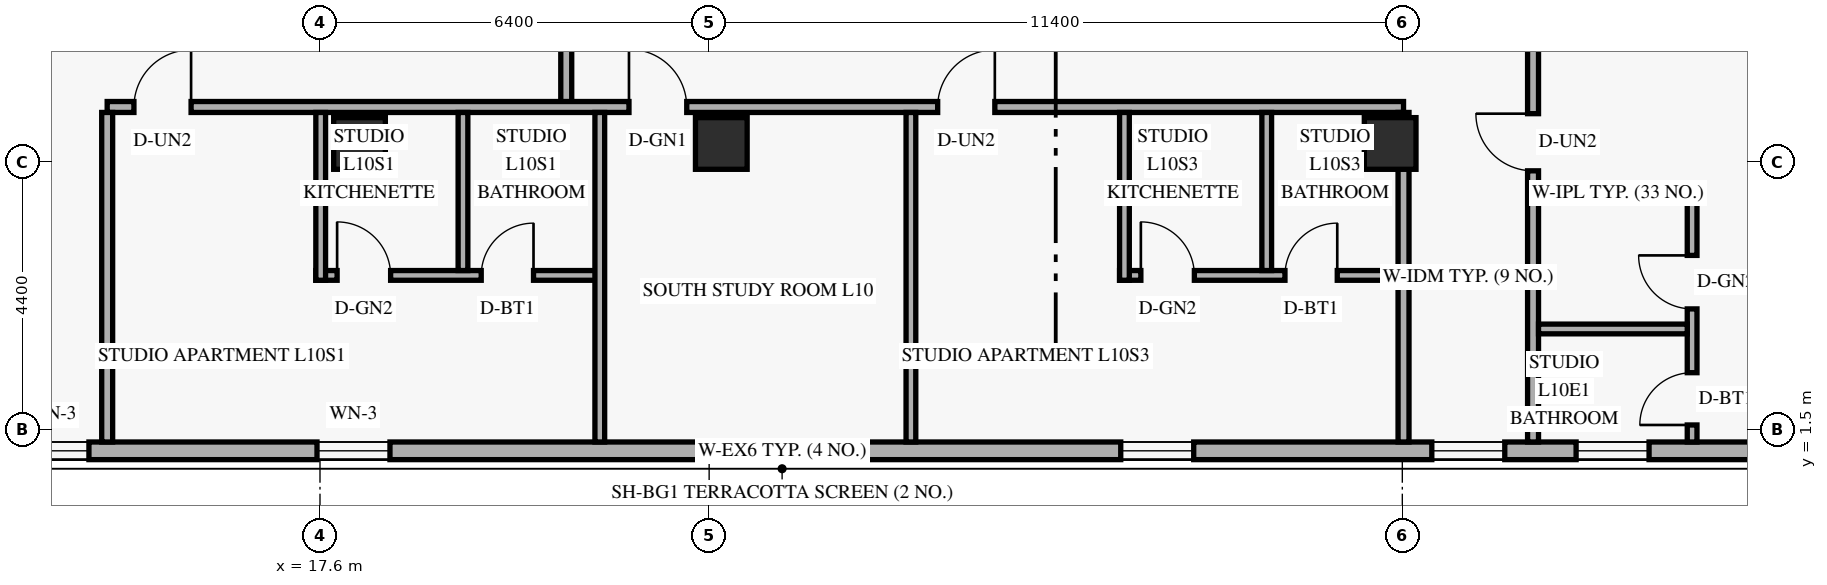
"""IFC4 building model, lengths in metres.
Left out: names, types, materials, properties, quantities, classifications, styles, units other than length and angle.
Written with IfcOpenShell. Run it as: python <this file> out.ifc"""

import sys

from ifc_helpers import new_model, si_unit, direction, frame, frame_2d, origin, origin_2d, place, context, subcontext, project, spatial, rectangle, extrude, element, fill, save


model = new_model("IFC4")
c1 = context("Model", 3, precision=1e-05, world=origin(), true_north=direction((0.0, 1.0)))
c2 = subcontext(c1, "Body", "Model", "MODEL_VIEW")
j1 = project(units=[si_unit("LENGTHUNIT", "METRE"), si_unit("PLANEANGLEUNIT", "RADIAN")], contexts=[c1])
p1 = place(None, origin())
s1 = spatial("IfcSite", under=j1, at=p1, CompositionType="ELEMENT")
p2 = place(p1, origin())
s2 = spatial("IfcBuilding", under=s1, at=p2, CompositionType="ELEMENT")
p3 = place(p2, frame((0.0, 0.0, 42.0)))
s3 = spatial("IfcBuildingStorey", under=s2, at=p3, CompositionType="ELEMENT", Elevation=42.0)
for number, where, z_axis, x_axis in (
    (1, (18.25, 6.2, 0.0), (0.0, 0.0, 1.0), (1.0, 0.0, 0.0)),
    (2, (24.2, 6.2, 0.0), (0.0, 0.0, 1.0), (1.0, 0.0, 0.0)),
    (3, (35.2, 6.2, 0.0), (0.0, 0.0, 1.0), (1.0, 0.0, 0.0)),
):
    element("IfcColumn", number, at=place(p3, frame(where, z_axis=z_axis, x_axis=x_axis)), inside=s3, PredefinedType="COLUMN", context=c2, shape_type="SweptSolid", body=[
        extrude(rectangle(XDim=0.85, YDim=0.85, at=origin_2d()), origin(), (0.0, 0.0, 1.0), 3.6),
    ])
p4 = place(p3, frame((5.42, 1.145, 0.0), z_axis=(0.0, 0.0, 1.0), x_axis=(1.0, 0.0, 0.0)))
e4 = element("IfcWall", 4, at=p4, inside=s3, PredefinedType="SOLIDWALL", context=c2, shape_type="SweptSolid", body=[
    extrude(rectangle(XDim=39.56, YDim=0.29, at=frame_2d((19.78, 0.0))), origin(), (0.0, 0.0, 1.0), 3.36),
])
p5 = place(p4, frame((2.84, 0.0, 0.85)))
e5 = element("IfcOpeningElement", 5, at=p5, cuts=e4, PredefinedType="OPENING", context=c2, shape_type="SweptSolid", body=[
    extrude(rectangle(XDim=1.2, YDim=1.5, at=frame_2d((0.6, 0.75))), frame((0.0, 0.155, 0.0), z_axis=(0.0, -1.0, 0.0), x_axis=(1.0, 0.0, 0.0)), (0.0, 0.0, 1.0), 0.31),
])
p6 = place(p4, frame((7.18, 0.0, 0.85)))
e6 = element("IfcOpeningElement", 6, at=p6, cuts=e4, PredefinedType="OPENING", context=c2, shape_type="SweptSolid", body=[
    extrude(rectangle(XDim=1.2, YDim=1.5, at=frame_2d((0.6, 0.75))), frame((0.0, 0.155, 0.0), z_axis=(0.0, -1.0, 0.0), x_axis=(1.0, 0.0, 0.0)), (0.0, 0.0, 1.0), 0.31),
])
p7 = place(p4, frame((12.131, 0.0, 0.85)))
e7 = element("IfcOpeningElement", 7, at=p7, cuts=e4, PredefinedType="OPENING", context=c2, shape_type="SweptSolid", body=[
    extrude(rectangle(XDim=1.2, YDim=1.5, at=frame_2d((0.6, 0.75))), frame((0.0, 0.155, 0.0), z_axis=(0.0, -1.0, 0.0), x_axis=(1.0, 0.0, 0.0)), (0.0, 0.0, 1.0), 0.31),
])
p8 = place(p4, frame((18.74, 0.0, 0.85)))
e8 = element("IfcOpeningElement", 8, at=p8, cuts=e4, PredefinedType="OPENING", context=c2, shape_type="SweptSolid", body=[
    extrude(rectangle(XDim=1.2, YDim=1.5, at=frame_2d((0.6, 0.75))), frame((0.0, 0.155, 0.0), z_axis=(0.0, -1.0, 0.0), x_axis=(1.0, 0.0, 0.0)), (0.0, 0.0, 1.0), 0.31),
])
p9 = place(p4, frame((25.349, 0.0, 0.85)))
e9 = element("IfcOpeningElement", 9, at=p9, cuts=e4, PredefinedType="OPENING", context=c2, shape_type="SweptSolid", body=[
    extrude(rectangle(XDim=1.2, YDim=1.5, at=frame_2d((0.6, 0.75))), frame((0.0, 0.155, 0.0), z_axis=(0.0, -1.0, 0.0), x_axis=(1.0, 0.0, 0.0)), (0.0, 0.0, 1.0), 0.31),
])
p10 = place(p4, frame((30.465, 0.0, 0.85)))
e10 = element("IfcOpeningElement", 10, at=p10, cuts=e4, PredefinedType="OPENING", context=c2, shape_type="SweptSolid", body=[
    extrude(rectangle(XDim=1.2, YDim=1.5, at=frame_2d((0.6, 0.75))), frame((0.0, 0.155, 0.0), z_axis=(0.0, -1.0, 0.0), x_axis=(1.0, 0.0, 0.0)), (0.0, 0.0, 1.0), 0.31),
])
p11 = place(p4, frame((32.838, 0.0, 0.85)))
e11 = element("IfcOpeningElement", 11, at=p11, cuts=e4, PredefinedType="OPENING", context=c2, shape_type="SweptSolid", body=[
    extrude(rectangle(XDim=1.2, YDim=1.5, at=frame_2d((0.6, 0.75))), frame((0.0, 0.155, 0.0), z_axis=(0.0, -1.0, 0.0), x_axis=(1.0, 0.0, 0.0)), (0.0, 0.0, 1.0), 0.31),
])
p12 = place(p4, frame((36.553, 0.0, 0.85)))
e12 = element("IfcOpeningElement", 12, at=p12, cuts=e4, PredefinedType="OPENING", context=c2, shape_type="SweptSolid", body=[
    extrude(rectangle(XDim=1.2, YDim=1.5, at=frame_2d((0.6, 0.75))), frame((0.0, 0.155, 0.0), z_axis=(0.0, -1.0, 0.0), x_axis=(1.0, 0.0, 0.0)), (0.0, 0.0, 1.0), 0.31),
])
p13 = place(p3, frame((37.55, 1.29, 0.0), z_axis=(0.0, 0.0, 1.0), x_axis=(0.0, 1.0, 0.0)))
e13 = element("IfcWall", 13, at=p13, inside=s3, PredefinedType="STANDARD", context=c2, shape_type="SweptSolid", body=[
    extrude(rectangle(XDim=45.42, YDim=0.18, at=frame_2d((22.71, 0.0))), origin(), (0.0, 0.0, 1.0), 2.649),
])
p14 = place(p13, frame((4.46, 0.0, 0.0)))
e14 = element("IfcOpeningElement", 14, at=p14, cuts=e13, PredefinedType="OPENING", context=c2, shape_type="SweptSolid", body=[
    extrude(rectangle(XDim=0.94, YDim=2.15, at=frame_2d((0.47, 1.075))), frame((0.0, 0.1, 0.0), z_axis=(0.0, -1.0, 0.0), x_axis=(1.0, 0.0, 0.0)), (0.0, 0.0, 1.0), 0.2),
])
p15 = place(p13, frame((15.907, 0.0, 0.0)))
e15 = element("IfcOpeningElement", 15, at=p15, cuts=e13, PredefinedType="OPENING", context=c2, shape_type="SweptSolid", body=[
    extrude(rectangle(XDim=0.94, YDim=2.15, at=frame_2d((0.47, 1.075))), frame((0.0, 0.1, 0.0), z_axis=(0.0, -1.0, 0.0), x_axis=(1.0, 0.0, 0.0)), (0.0, 0.0, 1.0), 0.2),
])
p16 = place(p13, frame((28.23, 0.0, 0.0)))
e16 = element("IfcOpeningElement", 16, at=p16, cuts=e13, PredefinedType="OPENING", context=c2, shape_type="SweptSolid", body=[
    extrude(rectangle(XDim=0.94, YDim=2.15, at=frame_2d((0.47, 1.075))), frame((0.0, 0.1, 0.0), z_axis=(0.0, -1.0, 0.0), x_axis=(1.0, 0.0, 0.0)), (0.0, 0.0, 1.0), 0.2),
])
p17 = place(p13, frame((40.02, 0.0, 0.0)))
e17 = element("IfcOpeningElement", 17, at=p17, cuts=e13, PredefinedType="OPENING", context=c2, shape_type="SweptSolid", body=[
    extrude(rectangle(XDim=0.94, YDim=2.15, at=frame_2d((0.47, 1.075))), frame((0.0, 0.1, 0.0), z_axis=(0.0, -1.0, 0.0), x_axis=(1.0, 0.0, 0.0)), (0.0, 0.0, 1.0), 0.2),
])
p18 = place(p3, frame((21.65, 6.8, 0.0), z_axis=(0.0, 0.0, 1.0), x_axis=(0.0, 1.0, 0.0)))
e18 = element("IfcWall", 18, at=p18, inside=s3, PredefinedType="STANDARD", context=c2, shape_type="SweptSolid", body=[
    extrude(rectangle(XDim=34.4, YDim=0.18, at=frame_2d((17.2, 0.0))), origin(), (0.0, 0.0, 1.0), 2.649),
])
p19 = place(p3, frame((14.1, 6.8, 0.0), z_axis=(0.0, 0.0, 1.0), x_axis=(1.0, 0.0, 0.0)))
e19 = element("IfcWall", 19, at=p19, inside=s3, PredefinedType="STANDARD", context=c2, shape_type="SweptSolid", body=[
    extrude(rectangle(XDim=21.32, YDim=0.18, at=frame_2d((10.66, 0.0))), origin(), (0.0, 0.0, 1.0), 2.649),
])
p20 = place(p19, frame((0.44, 0.0, 0.0)))
e20 = element("IfcOpeningElement", 20, at=p20, cuts=e19, PredefinedType="OPENING", context=c2, shape_type="SweptSolid", body=[
    extrude(rectangle(XDim=0.94, YDim=2.15, at=frame_2d((0.47, 1.075))), frame((0.0, 0.1, 0.0), z_axis=(0.0, -1.0, 0.0), x_axis=(1.0, 0.0, 0.0)), (0.0, 0.0, 1.0), 0.2),
])
p21 = place(p19, frame((8.582, 0.0, 0.0)))
e21 = element("IfcOpeningElement", 21, at=p21, cuts=e19, PredefinedType="OPENING", context=c2, shape_type="SweptSolid", body=[
    extrude(rectangle(XDim=0.95, YDim=2.15, at=frame_2d((0.475, 1.075))), frame((0.0, 0.1, 0.0), z_axis=(0.0, -1.0, 0.0), x_axis=(1.0, 0.0, 0.0)), (0.0, 0.0, 1.0), 0.2),
])
p22 = place(p19, frame((13.658, 0.0, 0.0)))
e22 = element("IfcOpeningElement", 22, at=p22, cuts=e19, PredefinedType="OPENING", context=c2, shape_type="SweptSolid", body=[
    extrude(rectangle(XDim=0.94, YDim=2.15, at=frame_2d((0.47, 1.075))), frame((0.0, 0.1, 0.0), z_axis=(0.0, -1.0, 0.0), x_axis=(1.0, 0.0, 0.0)), (0.0, 0.0, 1.0), 0.2),
])
p23 = place(p3, frame((35.42, 1.29, 0.0), z_axis=(0.0, 0.0, 1.0), x_axis=(0.0, 1.0, 0.0)))
e23 = element("IfcWall", 23, at=p23, inside=s3, PredefinedType="PARTITIONING", context=c2, shape_type="SweptSolid", body=[
    extrude(rectangle(XDim=5.42, YDim=0.18, at=frame_2d((2.71, 0.0))), origin(), (0.0, 0.0, 1.0), 3.36),
])
p24 = place(p3, frame((14.1, 1.29, 0.0), z_axis=(0.0, 0.0, 1.0), x_axis=(0.0, 1.0, 0.0)))
e24 = element("IfcWall", 24, at=p24, inside=s3, PredefinedType="PARTITIONING", context=c2, shape_type="SweptSolid", body=[
    extrude(rectangle(XDim=5.42, YDim=0.18, at=frame_2d((2.71, 0.0))), origin(), (0.0, 0.0, 1.0), 2.809),
])
p25 = place(p3, frame((37.64, 5.39, 0.0), z_axis=(0.0, 0.0, 1.0), x_axis=(1.0, 0.0, 0.0)))
e25 = element("IfcWall", 25, at=p25, inside=s3, PredefinedType="PLUMBINGWALL", context=c2, shape_type="SweptSolid", body=[
    extrude(rectangle(XDim=2.606, YDim=0.16, at=frame_2d((1.303, 0.0))), origin(), (0.0, 0.0, 1.0), 3.36),
])
p26 = place(p3, frame((40.166, 1.29, 0.0), z_axis=(0.0, 0.0, 1.0), x_axis=(0.0, 1.0, 0.0)))
e26 = element("IfcWall", 26, at=p26, inside=s3, PredefinedType="PLUMBINGWALL", context=c2, shape_type="SweptSolid", body=[
    extrude(rectangle(XDim=4.19, YDim=0.16, at=frame_2d((2.095, 0.0))), origin(), (0.0, 0.0, 1.0), 3.36),
])
p27 = place(p26, frame((0.28, 0.0, 0.0)))
e27 = element("IfcOpeningElement", 27, at=p27, cuts=e26, PredefinedType="OPENING", context=c2, shape_type="SweptSolid", body=[
    extrude(rectangle(XDim=0.86, YDim=2.12, at=frame_2d((0.43, 1.06))), frame((0.0, 0.09, 0.0), z_axis=(0.0, -1.0, 0.0), x_axis=(1.0, 0.0, 0.0)), (0.0, 0.0, 1.0), 0.18),
])
p28 = place(p26, frame((2.189, 0.0, 0.0)))
e28 = element("IfcOpeningElement", 28, at=p28, cuts=e26, PredefinedType="OPENING", context=c2, shape_type="SweptSolid", body=[
    extrude(rectangle(XDim=0.88, YDim=2.12, at=frame_2d((0.44, 1.06))), frame((0.0, 0.09, 0.0), z_axis=(0.0, -1.0, 0.0), x_axis=(1.0, 0.0, 0.0)), (0.0, 0.0, 1.0), 0.18),
])
p29 = place(p3, frame((37.64, 3.149, 0.0), z_axis=(0.0, 0.0, 1.0), x_axis=(1.0, 0.0, 0.0)))
e29 = element("IfcWall", 29, at=p29, inside=s3, PredefinedType="PLUMBINGWALL", context=c2, shape_type="SweptSolid", body=[
    extrude(rectangle(XDim=2.446, YDim=0.16, at=frame_2d((1.223, 0.0))), origin(), (0.0, 0.0, 1.0), 3.36),
])
p30 = place(p3, frame((17.531, 4.03, 0.0), z_axis=(0.0, 0.0, 1.0), x_axis=(1.0, 0.0, 0.0)))
e30 = element("IfcWall", 30, at=p30, inside=s3, PredefinedType="PLUMBINGWALL", context=c2, shape_type="SweptSolid", body=[
    extrude(rectangle(XDim=4.67, YDim=0.16, at=frame_2d((2.335, 0.0))), origin(), (0.0, 0.0, 1.0), 3.36),
])
p31 = place(p30, frame((0.35, 0.0, 0.0)))
e31 = element("IfcOpeningElement", 31, at=p31, cuts=e30, PredefinedType="OPENING", context=c2, shape_type="SweptSolid", body=[
    extrude(rectangle(XDim=0.88, YDim=2.12, at=frame_2d((0.44, 1.06))), frame((0.0, 0.09, 0.0), z_axis=(0.0, -1.0, 0.0), x_axis=(1.0, 0.0, 0.0)), (0.0, 0.0, 1.0), 0.18),
])
p32 = place(p30, frame((2.72, 0.0, 0.0)))
e32 = element("IfcOpeningElement", 32, at=p32, cuts=e30, PredefinedType="OPENING", context=c2, shape_type="SweptSolid", body=[
    extrude(rectangle(XDim=0.86, YDim=2.12, at=frame_2d((0.43, 1.06))), frame((0.0, 0.09, 0.0), z_axis=(0.0, -1.0, 0.0), x_axis=(1.0, 0.0, 0.0)), (0.0, 0.0, 1.0), 0.18),
])
p33 = place(p3, frame((17.612, 3.95, 0.0), z_axis=(0.0, 0.0, 1.0), x_axis=(0.0, 1.0, 0.0)))
e33 = element("IfcWall", 33, at=p33, inside=s3, PredefinedType="PLUMBINGWALL", context=c2, shape_type="SweptSolid", body=[
    extrude(rectangle(XDim=2.76, YDim=0.16, at=frame_2d((1.38, 0.0))), origin(), (0.0, 0.0, 1.0), 2.809),
])
p34 = place(p3, frame((19.952, 4.11, 0.0), z_axis=(0.0, 0.0, 1.0), x_axis=(0.0, 1.0, 0.0)))
e34 = element("IfcWall", 34, at=p34, inside=s3, PredefinedType="PLUMBINGWALL", context=c2, shape_type="SweptSolid", body=[
    extrude(rectangle(XDim=2.6, YDim=0.16, at=frame_2d((1.3, 0.0))), origin(), (0.0, 0.0, 1.0), 2.809),
])
for number, where, z_axis, x_axis in (
    (35, (22.202, 1.29, 0.0), (0.0, 0.0, 1.0), (0.0, 1.0, 0.0)),
    (36, (27.318, 1.29, 0.0), (0.0, 0.0, 1.0), (0.0, 1.0, 0.0)),
):
    element("IfcWall", number, at=place(p3, frame(where, z_axis=z_axis, x_axis=x_axis)), inside=s3, PredefinedType="PARTITIONING", context=c2, shape_type="SweptSolid", body=[
        extrude(rectangle(XDim=5.42, YDim=0.16, at=frame_2d((2.71, 0.0))), origin(), (0.0, 0.0, 1.0), 2.809),
    ])
p35 = place(p3, frame((30.75, 4.03, 0.0), z_axis=(0.0, 0.0, 1.0), x_axis=(1.0, 0.0, 0.0)))
e37 = element("IfcWall", 37, at=p35, inside=s3, PredefinedType="PLUMBINGWALL", context=c2, shape_type="SweptSolid", body=[
    extrude(rectangle(XDim=4.58, YDim=0.16, at=frame_2d((2.29, 0.0))), origin(), (0.0, 0.0, 1.0), 3.36),
])
p36 = place(p35, frame((0.35, 0.0, 0.0)))
e38 = element("IfcOpeningElement", 38, at=p36, cuts=e37, PredefinedType="OPENING", context=c2, shape_type="SweptSolid", body=[
    extrude(rectangle(XDim=0.88, YDim=2.12, at=frame_2d((0.44, 1.06))), frame((0.0, 0.09, 0.0), z_axis=(0.0, -1.0, 0.0), x_axis=(1.0, 0.0, 0.0)), (0.0, 0.0, 1.0), 0.18),
])
p37 = place(p35, frame((2.72, 0.0, 0.0)))
e39 = element("IfcOpeningElement", 39, at=p37, cuts=e37, PredefinedType="OPENING", context=c2, shape_type="SweptSolid", body=[
    extrude(rectangle(XDim=0.86, YDim=2.12, at=frame_2d((0.43, 1.06))), frame((0.0, 0.09, 0.0), z_axis=(0.0, -1.0, 0.0), x_axis=(1.0, 0.0, 0.0)), (0.0, 0.0, 1.0), 0.18),
])
p38 = place(p3, frame((30.83, 3.95, 0.0), z_axis=(0.0, 0.0, 1.0), x_axis=(0.0, 1.0, 0.0)))
e40 = element("IfcWall", 40, at=p38, inside=s3, PredefinedType="PLUMBINGWALL", context=c2, shape_type="SweptSolid", body=[
    extrude(rectangle(XDim=2.76, YDim=0.16, at=frame_2d((1.38, 0.0))), origin(), (0.0, 0.0, 1.0), 2.809),
])
p39 = place(p3, frame((33.17, 4.11, 0.0), z_axis=(0.0, 0.0, 1.0), x_axis=(0.0, 1.0, 0.0)))
e41 = element("IfcWall", 41, at=p39, inside=s3, PredefinedType="PLUMBINGWALL", context=c2, shape_type="SweptSolid", body=[
    extrude(rectangle(XDim=2.6, YDim=0.16, at=frame_2d((1.3, 0.0))), origin(), (0.0, 0.0, 1.0), 2.809),
])
p40 = place(p6, origin())
e42 = element("IfcWindow", 42, at=p40, inside=s3, PartitioningType="SINGLE_PANEL", PredefinedType="WINDOW", context=c2, shape_type="SweptSolid", body=[
    extrude(rectangle(XDim=1.2, YDim=1.5, at=frame_2d((0.6, 0.75))), frame((0.0, 0.03, 0.0), z_axis=(0.0, -1.0, 0.0), x_axis=(1.0, 0.0, 0.0)), (0.0, 0.0, 1.0), 0.06),
])
fill(e6, e42)
p41 = place(p7, origin())
e43 = element("IfcWindow", 43, at=p41, inside=s3, PartitioningType="SINGLE_PANEL", PredefinedType="WINDOW", context=c2, shape_type="SweptSolid", body=[
    extrude(rectangle(XDim=1.2, YDim=1.5, at=frame_2d((0.6, 0.75))), frame((0.0, 0.03, 0.0), z_axis=(0.0, -1.0, 0.0), x_axis=(1.0, 0.0, 0.0)), (0.0, 0.0, 1.0), 0.06),
])
fill(e7, e43)
p42 = place(p8, origin())
e44 = element("IfcWindow", 44, at=p42, inside=s3, PartitioningType="SINGLE_PANEL", PredefinedType="WINDOW", context=c2, shape_type="SweptSolid", body=[
    extrude(rectangle(XDim=1.2, YDim=1.5, at=frame_2d((0.6, 0.75))), frame((0.0, 0.03, 0.0), z_axis=(0.0, -1.0, 0.0), x_axis=(1.0, 0.0, 0.0)), (0.0, 0.0, 1.0), 0.06),
])
fill(e8, e44)
p43 = place(p9, origin())
e45 = element("IfcWindow", 45, at=p43, inside=s3, PartitioningType="SINGLE_PANEL", PredefinedType="WINDOW", context=c2, shape_type="SweptSolid", body=[
    extrude(rectangle(XDim=1.2, YDim=1.5, at=frame_2d((0.6, 0.75))), frame((0.0, 0.03, 0.0), z_axis=(0.0, -1.0, 0.0), x_axis=(1.0, 0.0, 0.0)), (0.0, 0.0, 1.0), 0.06),
])
fill(e9, e45)
p44 = place(p10, origin())
e46 = element("IfcWindow", 46, at=p44, inside=s3, PartitioningType="SINGLE_PANEL", PredefinedType="WINDOW", context=c2, shape_type="SweptSolid", body=[
    extrude(rectangle(XDim=1.2, YDim=1.5, at=frame_2d((0.6, 0.75))), frame((0.0, 0.03, 0.0), z_axis=(0.0, -1.0, 0.0), x_axis=(1.0, 0.0, 0.0)), (0.0, 0.0, 1.0), 0.06),
])
fill(e10, e46)
p45 = place(p11, origin())
e47 = element("IfcWindow", 47, at=p45, inside=s3, PartitioningType="SINGLE_PANEL", PredefinedType="WINDOW", context=c2, shape_type="SweptSolid", body=[
    extrude(rectangle(XDim=1.2, YDim=1.5, at=frame_2d((0.6, 0.75))), frame((0.0, 0.03, 0.0), z_axis=(0.0, -1.0, 0.0), x_axis=(1.0, 0.0, 0.0)), (0.0, 0.0, 1.0), 0.06),
])
fill(e11, e47)
p46 = place(p14, origin())
e48 = element("IfcDoor", 48, at=p46, inside=s3, OperationType="SINGLE_SWING_RIGHT", PredefinedType="DOOR", context=c2, shape_type="SweptSolid", body=[
    extrude(rectangle(XDim=0.94, YDim=2.15, at=frame_2d((0.47, 1.075))), frame((0.0, 0.025, 0.0), z_axis=(0.0, -1.0, 0.0), x_axis=(1.0, 0.0, 0.0)), (0.0, 0.0, 1.0), 0.05),
])
fill(e14, e48)
p47 = place(p27, origin())
e49 = element("IfcDoor", 49, at=p47, inside=s3, OperationType="SINGLE_SWING_LEFT", PredefinedType="DOOR", context=c2, shape_type="SweptSolid", body=[
    extrude(rectangle(XDim=0.86, YDim=2.12, at=frame_2d((0.43, 1.06))), frame((0.0, 0.025, 0.0), z_axis=(0.0, -1.0, 0.0), x_axis=(1.0, 0.0, 0.0)), (0.0, 0.0, 1.0), 0.05),
])
fill(e27, e49)
p48 = place(p28, origin())
e50 = element("IfcDoor", 50, at=p48, inside=s3, OperationType="SINGLE_SWING_RIGHT", PredefinedType="DOOR", context=c2, shape_type="SweptSolid", body=[
    extrude(rectangle(XDim=0.88, YDim=2.12, at=frame_2d((0.44, 1.06))), frame((0.0, 0.025, 0.0), z_axis=(0.0, -1.0, 0.0), x_axis=(1.0, 0.0, 0.0)), (0.0, 0.0, 1.0), 0.05),
])
fill(e28, e50)
p49 = place(p20, origin())
e51 = element("IfcDoor", 51, at=p49, inside=s3, OperationType="SINGLE_SWING_RIGHT", PredefinedType="DOOR", context=c2, shape_type="SweptSolid", body=[
    extrude(rectangle(XDim=0.94, YDim=2.15, at=frame_2d((0.47, 1.075))), frame((0.0, 0.025, 0.0), z_axis=(0.0, -1.0, 0.0), x_axis=(1.0, 0.0, 0.0)), (0.0, 0.0, 1.0), 0.05),
])
fill(e20, e51)
p50 = place(p31, origin())
e52 = element("IfcDoor", 52, at=p50, inside=s3, OperationType="SINGLE_SWING_LEFT", PredefinedType="DOOR", context=c2, shape_type="SweptSolid", body=[
    extrude(rectangle(XDim=0.88, YDim=2.12, at=frame_2d((0.44, 1.06))), frame((0.0, 0.025, 0.0), z_axis=(0.0, -1.0, 0.0), x_axis=(1.0, 0.0, 0.0)), (0.0, 0.0, 1.0), 0.05),
])
fill(e31, e52)
p51 = place(p32, origin())
e53 = element("IfcDoor", 53, at=p51, inside=s3, OperationType="SINGLE_SWING_RIGHT", PredefinedType="DOOR", context=c2, shape_type="SweptSolid", body=[
    extrude(rectangle(XDim=0.86, YDim=2.12, at=frame_2d((0.43, 1.06))), frame((0.0, 0.025, 0.0), z_axis=(0.0, -1.0, 0.0), x_axis=(1.0, 0.0, 0.0)), (0.0, 0.0, 1.0), 0.05),
])
fill(e32, e53)
p52 = place(p21, origin())
e54 = element("IfcDoor", 54, at=p52, inside=s3, OperationType="SINGLE_SWING_LEFT", PredefinedType="DOOR", context=c2, shape_type="SweptSolid", body=[
    extrude(rectangle(XDim=0.95, YDim=2.15, at=frame_2d((0.475, 1.075))), frame((0.0, 0.025, 0.0), z_axis=(0.0, -1.0, 0.0), x_axis=(1.0, 0.0, 0.0)), (0.0, 0.0, 1.0), 0.05),
])
fill(e21, e54)
p53 = place(p22, origin())
e55 = element("IfcDoor", 55, at=p53, inside=s3, OperationType="SINGLE_SWING_RIGHT", PredefinedType="DOOR", context=c2, shape_type="SweptSolid", body=[
    extrude(rectangle(XDim=0.94, YDim=2.15, at=frame_2d((0.47, 1.075))), frame((0.0, 0.025, 0.0), z_axis=(0.0, -1.0, 0.0), x_axis=(1.0, 0.0, 0.0)), (0.0, 0.0, 1.0), 0.05),
])
fill(e22, e55)
p54 = place(p36, origin())
e56 = element("IfcDoor", 56, at=p54, inside=s3, OperationType="SINGLE_SWING_LEFT", PredefinedType="DOOR", context=c2, shape_type="SweptSolid", body=[
    extrude(rectangle(XDim=0.88, YDim=2.12, at=frame_2d((0.44, 1.06))), frame((0.0, 0.025, 0.0), z_axis=(0.0, -1.0, 0.0), x_axis=(1.0, 0.0, 0.0)), (0.0, 0.0, 1.0), 0.05),
])
fill(e38, e56)
p55 = place(p37, origin())
e57 = element("IfcDoor", 57, at=p55, inside=s3, OperationType="SINGLE_SWING_RIGHT", PredefinedType="DOOR", context=c2, shape_type="SweptSolid", body=[
    extrude(rectangle(XDim=0.86, YDim=2.12, at=frame_2d((0.43, 1.06))), frame((0.0, 0.025, 0.0), z_axis=(0.0, -1.0, 0.0), x_axis=(1.0, 0.0, 0.0)), (0.0, 0.0, 1.0), 0.05),
])
fill(e39, e57)
save(model, sys.argv[1])
